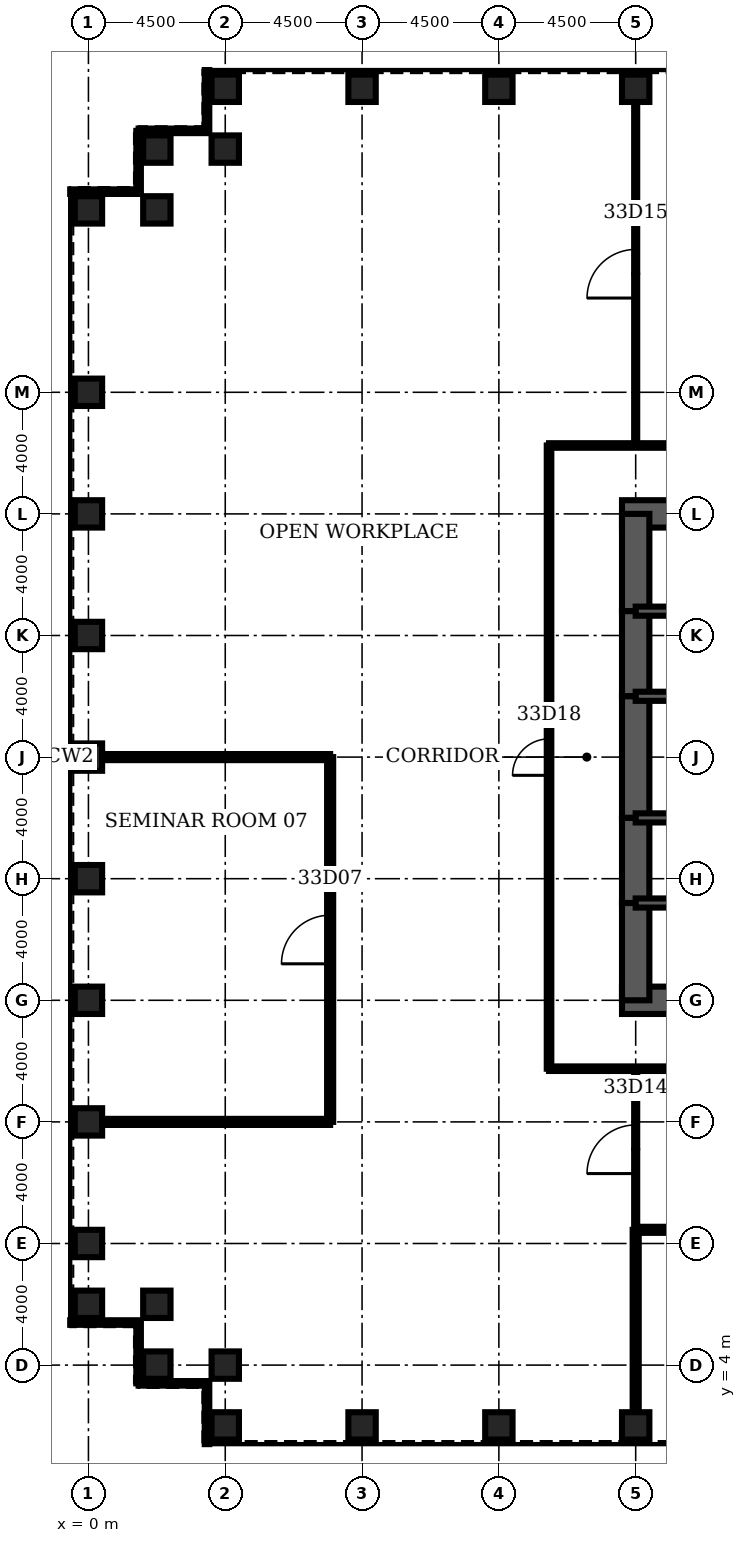
"""IFC4 building model, lengths in metres.
Left out: names, types, materials, properties, quantities, classifications, styles, units other than length and angle.
Written with IfcOpenShell. Run it as: python <this file> out.ifc"""

import sys

from ifc_helpers import new_model, si_unit, direction, frame, frame_2d, origin, origin_2d, place, context, subcontext, project, spatial, rectangle, hollow_rectangle, extrude, element, fill, save


model = new_model("IFC4")
c1 = context("Model", 3, precision=1e-05, world=origin(), true_north=direction((0.0, 1.0)))
c2 = subcontext(c1, "Body", "Model", "MODEL_VIEW")
j1 = project(units=[si_unit("LENGTHUNIT", "METRE"), si_unit("PLANEANGLEUNIT", "RADIAN")], contexts=[c1])
p1 = place(None, origin())
s1 = spatial("IfcSite", under=j1, at=p1, CompositionType="ELEMENT")
p2 = place(p1, origin())
s2 = spatial("IfcBuilding", under=s1, at=p2, CompositionType="ELEMENT")
p3 = place(p2, frame((0.0, 0.0, 150.9)))
s3 = spatial("IfcBuildingStorey", under=s2, at=p3, CompositionType="ELEMENT", Elevation=150.9)
for number, where, z_axis, x_axis in (
    (1, (4.5, 2.0, 0.0), (0.0, 0.0, 1.0), (0.0, 1.0, 0.0)),
    (2, (9.0, 2.0, 0.0), (0.0, 0.0, 1.0), (0.0, 1.0, 0.0)),
    (3, (13.5, 2.0, 0.0), (0.0, 0.0, 1.0), (0.0, 1.0, 0.0)),
    (4, (18.0, 2.0, 0.0), (0.0, 0.0, 1.0), (0.0, 1.0, 0.0)),
    (5, (18.0, 46.0, 0.0), (0.0, 0.0, 1.0), (0.0, 1.0, 0.0)),
    (6, (13.5, 46.0, 0.0), (0.0, 0.0, 1.0), (0.0, 1.0, 0.0)),
    (7, (9.0, 46.0, 0.0), (0.0, 0.0, 1.0), (0.0, 1.0, 0.0)),
    (8, (4.5, 46.0, 0.0), (0.0, 0.0, 1.0), (0.0, 1.0, 0.0)),
    (9, (4.5, 44.0, 0.0), (0.0, 0.0, 1.0), (0.0, 1.0, 0.0)),
    (10, (2.25, 44.0, 0.0), (0.0, 0.0, 1.0), (1.0, 0.0, 0.0)),
    (11, (2.25, 42.0, 0.0), (0.0, 0.0, 1.0), (1.0, 0.0, 0.0)),
    (12, (0.0, 42.0, 0.0), (0.0, 0.0, 1.0), (1.0, 0.0, 0.0)),
    (13, (0.0, 36.0, 0.0), (0.0, 0.0, 1.0), (1.0, 0.0, 0.0)),
    (14, (0.0, 32.0, 0.0), (0.0, 0.0, 1.0), (1.0, 0.0, 0.0)),
    (15, (0.0, 28.0, 0.0), (0.0, 0.0, 1.0), (1.0, 0.0, 0.0)),
    (16, (0.0, 24.0, 0.0), (0.0, 0.0, 1.0), (1.0, 0.0, 0.0)),
    (17, (0.0, 20.0, 0.0), (0.0, 0.0, 1.0), (1.0, 0.0, 0.0)),
    (18, (0.0, 16.0, 0.0), (0.0, 0.0, 1.0), (1.0, 0.0, 0.0)),
    (19, (0.0, 12.0, 0.0), (0.0, 0.0, 1.0), (1.0, 0.0, 0.0)),
    (20, (0.0, 8.0, 0.0), (0.0, 0.0, 1.0), (1.0, 0.0, 0.0)),
    (21, (0.0, 6.0, 0.0), (0.0, 0.0, 1.0), (1.0, 0.0, 0.0)),
    (22, (2.25, 6.0, 0.0), (0.0, 0.0, 1.0), (1.0, 0.0, 0.0)),
    (23, (2.25, 4.0, 0.0), (0.0, 0.0, 1.0), (1.0, 0.0, 0.0)),
    (24, (4.5, 4.0, 0.0), (0.0, 0.0, 1.0), (0.0, 1.0, 0.0)),
):
    element("IfcColumn", number, at=place(p3, frame(where, z_axis=z_axis, x_axis=x_axis)), inside=s3, PredefinedType="COLUMN", context=c2, shape_type="SweptSolid", body=[
        extrude(hollow_rectangle(XDim=0.9, YDim=0.9, WallThickness=0.1, at=origin_2d()), origin(), (0.0, 0.0, 1.0), 4.2),
    ])
for number, where, z_axis, x_axis in (
    (25, (17.55, 16.0, 0.0), (0.0, 0.0, 1.0), (1.0, 0.0, 0.0)),
    (26, (27.0, 32.0, 0.0), (0.0, 0.0, 1.0), (-1.0, 0.0, 0.0)),
):
    element("IfcWall", number, at=place(p3, frame(where, z_axis=z_axis, x_axis=x_axis)), inside=s3, PredefinedType="SHEAR", context=c2, shape_type="SweptSolid", body=[
        extrude(rectangle(XDim=9.45, YDim=0.9, at=frame_2d((4.725, 0.0))), origin(), (0.0, 0.0, 1.0), 4.2),
    ])
p4 = place(p3, frame((18.0, 32.0, 0.0), z_axis=(0.0, 0.0, 1.0), x_axis=(0.0, -1.0, 0.0)))
e27 = element("IfcWall", 27, at=p4, inside=s3, PredefinedType="SHEAR", context=c2, shape_type="SweptSolid", body=[
    extrude(rectangle(XDim=3.2, YDim=0.9, at=frame_2d((1.6, 0.0))), origin(), (0.0, 0.0, 1.0), 4.2),
])
p5 = place(p3, frame((18.0, 28.8, 0.0), z_axis=(0.0, 0.0, 1.0), x_axis=(0.0, -1.0, 0.0)))
e28 = element("IfcWall", 28, at=p5, inside=s3, PredefinedType="SHEAR", context=c2, shape_type="SweptSolid", body=[
    extrude(rectangle(XDim=2.8, YDim=0.9, at=frame_2d((1.4, 0.0))), origin(), (0.0, 0.0, 1.0), 4.2),
])
p6 = place(p5, frame((0.4, 0.0, 0.0)))
e29 = element("IfcOpeningElement", 29, at=p6, cuts=e28, PredefinedType="OPENING", context=c2, shape_type="SweptSolid", body=[
    extrude(rectangle(XDim=1.8, YDim=2.1, at=frame_2d((0.9, 1.05))), frame((0.0, 0.46, 0.0), z_axis=(0.0, -1.0, 0.0), x_axis=(1.0, 0.0, 0.0)), (0.0, 0.0, 1.0), 0.92),
])
p7 = place(p3, frame((18.0, 26.0, 0.0), z_axis=(0.0, 0.0, 1.0), x_axis=(0.0, -1.0, 0.0)))
e30 = element("IfcWall", 30, at=p7, inside=s3, PredefinedType="SHEAR", context=c2, shape_type="SweptSolid", body=[
    extrude(rectangle(XDim=4.0, YDim=0.9, at=frame_2d((2.0, 0.0))), origin(), (0.0, 0.0, 1.0), 4.2),
])
p8 = place(p3, frame((18.0, 22.0, 0.0), z_axis=(0.0, 0.0, 1.0), x_axis=(0.0, -1.0, 0.0)))
e31 = element("IfcWall", 31, at=p8, inside=s3, PredefinedType="SHEAR", context=c2, shape_type="SweptSolid", body=[
    extrude(rectangle(XDim=2.8, YDim=0.9, at=frame_2d((1.4, 0.0))), origin(), (0.0, 0.0, 1.0), 4.2),
])
p9 = place(p8, frame((0.6, 0.0, 0.0)))
e32 = element("IfcOpeningElement", 32, at=p9, cuts=e31, PredefinedType="OPENING", context=c2, shape_type="SweptSolid", body=[
    extrude(rectangle(XDim=1.8, YDim=2.1, at=frame_2d((0.9, 1.05))), frame((0.0, 0.46, 0.0), z_axis=(0.0, -1.0, 0.0), x_axis=(1.0, 0.0, 0.0)), (0.0, 0.0, 1.0), 0.92),
])
p10 = place(p3, frame((18.0, 19.2, 0.0), z_axis=(0.0, 0.0, 1.0), x_axis=(0.0, -1.0, 0.0)))
e33 = element("IfcWall", 33, at=p10, inside=s3, PredefinedType="SHEAR", context=c2, shape_type="SweptSolid", body=[
    extrude(rectangle(XDim=3.2, YDim=0.9, at=frame_2d((1.6, 0.0))), origin(), (0.0, 0.0, 1.0), 4.2),
])
p11 = place(p3, frame((18.0, 19.2, 0.0), z_axis=(0.0, 0.0, 1.0), x_axis=(1.0, 0.0, 0.0)))
e34 = element("IfcWall", 34, at=p11, inside=s3, PredefinedType="SOLIDWALL", context=c2, shape_type="SweptSolid", body=[
    extrude(rectangle(XDim=9.0, YDim=0.3, at=frame_2d((4.5, 0.0))), origin(), (0.0, 0.0, 1.0), 4.2),
])
p12 = place(p11, frame((0.65, 0.0, 0.0)))
e35 = element("IfcOpeningElement", 35, at=p12, cuts=e34, PredefinedType="OPENING", context=c2, shape_type="SweptSolid", body=[
    extrude(rectangle(XDim=1.0, YDim=2.1, at=frame_2d((0.5, 1.05))), frame((0.0, 0.16, 0.0), z_axis=(0.0, -1.0, 0.0), x_axis=(1.0, 0.0, 0.0)), (0.0, 0.0, 1.0), 0.32),
])
p13 = place(p3, frame((18.0, 28.8, 0.0), z_axis=(0.0, 0.0, 1.0), x_axis=(1.0, 0.0, 0.0)))
e36 = element("IfcWall", 36, at=p13, inside=s3, PredefinedType="SOLIDWALL", context=c2, shape_type="SweptSolid", body=[
    extrude(rectangle(XDim=9.0, YDim=0.3, at=frame_2d((4.5, 0.0))), origin(), (0.0, 0.0, 1.0), 4.2),
])
p14 = place(p13, frame((0.65, 0.0, 0.0)))
e37 = element("IfcOpeningElement", 37, at=p14, cuts=e36, PredefinedType="OPENING", context=c2, shape_type="SweptSolid", body=[
    extrude(rectangle(XDim=1.0, YDim=2.1, at=frame_2d((0.5, 1.05))), frame((0.0, 0.16, 0.0), z_axis=(0.0, -1.0, 0.0), x_axis=(1.0, 0.0, 0.0)), (0.0, 0.0, 1.0), 0.32),
])
p15 = place(p3, frame((18.0, 22.0, 0.0), z_axis=(0.0, 0.0, 1.0), x_axis=(1.0, 0.0, 0.0)))
e38 = element("IfcWall", 38, at=p15, inside=s3, PredefinedType="SOLIDWALL", context=c2, shape_type="SweptSolid", body=[
    extrude(rectangle(XDim=6.0, YDim=0.3, at=frame_2d((3.0, 0.0))), origin(), (0.0, 0.0, 1.0), 4.2),
])
p16 = place(p15, frame((4.4, 0.0, 0.0)))
e39 = element("IfcOpeningElement", 39, at=p16, cuts=e38, PredefinedType="OPENING", context=c2, shape_type="SweptSolid", body=[
    extrude(rectangle(XDim=1.0, YDim=2.1, at=frame_2d((0.5, 1.05))), frame((0.0, 0.16, 0.0), z_axis=(0.0, -1.0, 0.0), x_axis=(1.0, 0.0, 0.0)), (0.0, 0.0, 1.0), 0.32),
])
p17 = place(p15, frame((0.85, 0.0, 0.0)))
e40 = element("IfcOpeningElement", 40, at=p17, cuts=e38, PredefinedType="OPENING", context=c2, shape_type="SweptSolid", body=[
    extrude(rectangle(XDim=1.0, YDim=2.1, at=frame_2d((0.5, 1.05))), frame((0.0, 0.16, 0.0), z_axis=(0.0, -1.0, 0.0), x_axis=(1.0, 0.0, 0.0)), (0.0, 0.0, 1.0), 0.32),
])
p18 = place(p3, frame((18.0, 26.0, 0.0), z_axis=(0.0, 0.0, 1.0), x_axis=(1.0, 0.0, 0.0)))
e41 = element("IfcWall", 41, at=p18, inside=s3, PredefinedType="SOLIDWALL", context=c2, shape_type="SweptSolid", body=[
    extrude(rectangle(XDim=6.0, YDim=0.3, at=frame_2d((3.0, 0.0))), origin(), (0.0, 0.0, 1.0), 4.2),
])
p19 = place(p3, frame((18.0, 8.45, 0.0), z_axis=(0.0, 0.0, 1.0), x_axis=(1.0, 0.0, 0.0)))
e42 = element("IfcWall", 42, at=p19, inside=s3, PredefinedType="PARTITIONING", context=c2, shape_type="SweptSolid", body=[
    extrude(rectangle(XDim=36.0, YDim=0.2, at=frame_2d((18.0, 0.0))), origin(), (0.0, 0.0, 1.0), 3.0),
])
p20 = place(p19, frame((3.7, 0.0, 0.0)))
e43 = element("IfcOpeningElement", 43, at=p20, cuts=e42, PredefinedType="OPENING", context=c2, shape_type="SweptSolid", body=[
    extrude(rectangle(XDim=1.6, YDim=2.1, at=frame_2d((0.8, 1.05))), frame((0.0, 0.11, 0.0), z_axis=(0.0, -1.0, 0.0), x_axis=(1.0, 0.0, 0.0)), (0.0, 0.0, 1.0), 0.22),
])
p21 = place(p19, frame((12.7, 0.0, 0.0)))
e44 = element("IfcOpeningElement", 44, at=p21, cuts=e42, PredefinedType="OPENING", context=c2, shape_type="SweptSolid", body=[
    extrude(rectangle(XDim=1.6, YDim=2.1, at=frame_2d((0.8, 1.05))), frame((0.0, 0.11, 0.0), z_axis=(0.0, -1.0, 0.0), x_axis=(1.0, 0.0, 0.0)), (0.0, 0.0, 1.0), 0.22),
])
p22 = place(p19, frame((21.7, 0.0, 0.0)))
e45 = element("IfcOpeningElement", 45, at=p22, cuts=e42, PredefinedType="OPENING", context=c2, shape_type="SweptSolid", body=[
    extrude(rectangle(XDim=1.6, YDim=2.1, at=frame_2d((0.8, 1.05))), frame((0.0, 0.11, 0.0), z_axis=(0.0, -1.0, 0.0), x_axis=(1.0, 0.0, 0.0)), (0.0, 0.0, 1.0), 0.22),
])
p23 = place(p19, frame((30.7, 0.0, 0.0)))
e46 = element("IfcOpeningElement", 46, at=p23, cuts=e42, PredefinedType="OPENING", context=c2, shape_type="SweptSolid", body=[
    extrude(rectangle(XDim=1.6, YDim=2.1, at=frame_2d((0.8, 1.05))), frame((0.0, 0.11, 0.0), z_axis=(0.0, -1.0, 0.0), x_axis=(1.0, 0.0, 0.0)), (0.0, 0.0, 1.0), 0.22),
])
p24 = place(p3, frame((0.45, 12.0, 0.0), z_axis=(0.0, 0.0, 1.0), x_axis=(1.0, 0.0, 0.0)))
e47 = element("IfcWall", 47, at=p24, inside=s3, PredefinedType="PARTITIONING", context=c2, shape_type="SweptSolid", body=[
    extrude(rectangle(XDim=7.5, YDim=0.2, at=frame_2d((3.75, 0.0))), origin(), (0.0, 0.0, 1.0), 3.0),
])
p25 = place(p3, frame((15.15, 13.75, 0.0), z_axis=(0.0, 0.0, 1.0), x_axis=(1.0, 0.0, 0.0)))
e48 = element("IfcWall", 48, at=p25, inside=s3, PredefinedType="PARTITIONING", context=c2, shape_type="SweptSolid", body=[
    extrude(rectangle(XDim=41.7, YDim=0.15, at=frame_2d((20.85, 0.0))), origin(), (0.0, 0.0, 1.0), 3.0),
])
p26 = place(p25, frame((18.75, 0.0, 0.0)))
e49 = element("IfcOpeningElement", 49, at=p26, cuts=e48, PredefinedType="OPENING", context=c2, shape_type="SweptSolid", body=[
    extrude(rectangle(XDim=1.2, YDim=2.1, at=frame_2d((0.6, 1.05))), frame((0.0, 0.085, 0.0), z_axis=(0.0, -1.0, 0.0), x_axis=(1.0, 0.0, 0.0)), (0.0, 0.0, 1.0), 0.17),
])
p27 = place(p3, frame((0.45, 24.0, 0.0), z_axis=(0.0, 0.0, 1.0), x_axis=(1.0, 0.0, 0.0)))
e50 = element("IfcWall", 50, at=p27, inside=s3, PredefinedType="PARTITIONING", context=c2, shape_type="SweptSolid", body=[
    extrude(rectangle(XDim=7.5, YDim=0.2, at=frame_2d((3.75, 0.0))), origin(), (0.0, 0.0, 1.0), 3.0),
])
p28 = place(p3, frame((15.15, 34.25, 0.0), z_axis=(0.0, 0.0, 1.0), x_axis=(1.0, 0.0, 0.0)))
e51 = element("IfcWall", 51, at=p28, inside=s3, PredefinedType="PARTITIONING", context=c2, shape_type="SweptSolid", body=[
    extrude(rectangle(XDim=41.7, YDim=0.15, at=frame_2d((20.85, 0.0))), origin(), (0.0, 0.0, 1.0), 3.0),
])
p29 = place(p28, frame((20.25, 0.0, 0.0)))
e52 = element("IfcOpeningElement", 52, at=p29, cuts=e51, PredefinedType="OPENING", context=c2, shape_type="SweptSolid", body=[
    extrude(rectangle(XDim=1.2, YDim=2.1, at=frame_2d((0.6, 1.05))), frame((0.0, 0.085, 0.0), z_axis=(0.0, -1.0, 0.0), x_axis=(1.0, 0.0, 0.0)), (0.0, 0.0, 1.0), 0.17),
])
p30 = place(p3, frame((7.95, 12.0, 0.0), z_axis=(0.0, 0.0, 1.0), x_axis=(0.0, 1.0, 0.0)))
e53 = element("IfcWall", 53, at=p30, inside=s3, PredefinedType="PARTITIONING", context=c2, shape_type="SweptSolid", body=[
    extrude(rectangle(XDim=12.0, YDim=0.2, at=frame_2d((6.0, 0.0))), origin(), (0.0, 0.0, 1.0), 3.0),
])
p31 = place(p30, frame((5.2, 0.0, 0.0)))
e54 = element("IfcOpeningElement", 54, at=p31, cuts=e53, PredefinedType="OPENING", context=c2, shape_type="SweptSolid", body=[
    extrude(rectangle(XDim=1.6, YDim=2.1, at=frame_2d((0.8, 1.05))), frame((0.0, 0.11, 0.0), z_axis=(0.0, -1.0, 0.0), x_axis=(1.0, 0.0, 0.0)), (0.0, 0.0, 1.0), 0.22),
])
p32 = place(p3, frame((15.15, 13.75, 0.0), z_axis=(0.0, 0.0, 1.0), x_axis=(0.0, 1.0, 0.0)))
e55 = element("IfcWall", 55, at=p32, inside=s3, PredefinedType="PARTITIONING", context=c2, shape_type="SweptSolid", body=[
    extrude(rectangle(XDim=20.5, YDim=0.15, at=frame_2d((10.25, 0.0))), origin(), (0.0, 0.0, 1.0), 3.0),
])
p33 = place(p32, frame((9.65, 0.0, 0.0)))
e56 = element("IfcOpeningElement", 56, at=p33, cuts=e55, PredefinedType="OPENING", context=c2, shape_type="SweptSolid", body=[
    extrude(rectangle(XDim=1.2, YDim=2.1, at=frame_2d((0.6, 1.05))), frame((0.0, 0.085, 0.0), z_axis=(0.0, -1.0, 0.0), x_axis=(1.0, 0.0, 0.0)), (0.0, 0.0, 1.0), 0.17),
])
p34 = place(p3, frame((18.0, 2.45, 0.0), z_axis=(0.0, 0.0, 1.0), x_axis=(0.0, 1.0, 0.0)))
e57 = element("IfcWall", 57, at=p34, inside=s3, PredefinedType="PARTITIONING", context=c2, shape_type="SweptSolid", body=[
    extrude(rectangle(XDim=6.0, YDim=0.2, at=frame_2d((3.0, 0.0))), origin(), (0.0, 0.0, 1.0), 3.0),
])
p35 = place(p3, frame((18.0, 8.45, 0.0), z_axis=(0.0, 0.0, 1.0), x_axis=(0.0, 1.0, 0.0)))
e58 = element("IfcWall", 58, at=p35, inside=s3, PredefinedType="PARTITIONING", context=c2, shape_type="SweptSolid", body=[
    extrude(rectangle(XDim=5.3, YDim=0.1, at=frame_2d((2.65, 0.0))), origin(), (0.0, 0.0, 1.0), 3.0),
])
p36 = place(p35, frame((1.85, 0.0, 0.0)))
e59 = element("IfcOpeningElement", 59, at=p36, cuts=e58, PredefinedType="OPENING", context=c2, shape_type="SweptSolid", body=[
    extrude(rectangle(XDim=1.6, YDim=2.1, at=frame_2d((0.8, 1.05))), frame((0.0, 0.06, 0.0), z_axis=(0.0, -1.0, 0.0), x_axis=(1.0, 0.0, 0.0)), (0.0, 0.0, 1.0), 0.12),
])
p37 = place(p3, frame((18.0, 34.25, 0.0), z_axis=(0.0, 0.0, 1.0), x_axis=(0.0, 1.0, 0.0)))
e60 = element("IfcWall", 60, at=p37, inside=s3, PredefinedType="PARTITIONING", context=c2, shape_type="SweptSolid", body=[
    extrude(rectangle(XDim=11.3, YDim=0.1, at=frame_2d((5.65, 0.0))), origin(), (0.0, 0.0, 1.0), 3.0),
])
p38 = place(p37, frame((4.85, 0.0, 0.0)))
e61 = element("IfcOpeningElement", 61, at=p38, cuts=e60, PredefinedType="OPENING", context=c2, shape_type="SweptSolid", body=[
    extrude(rectangle(XDim=1.6, YDim=2.1, at=frame_2d((0.8, 1.05))), frame((0.0, 0.06, 0.0), z_axis=(0.0, -1.0, 0.0), x_axis=(1.0, 0.0, 0.0)), (0.0, 0.0, 1.0), 0.12),
])
p39 = place(p3, frame((3.9, 46.6, 0.0), z_axis=(0.0, 0.0, 1.0), x_axis=(0.0, -1.0, 0.0)))
e62 = element("IfcWall", 62, at=p39, inside=s3, PredefinedType="ELEMENTEDWALL", context=c2, shape_type="SweptSolid", body=[
    extrude(rectangle(XDim=2.0, YDim=0.15, at=frame_2d((1.0, 0.0))), origin(), (0.0, 0.0, 1.0), 4.04),
])
p40 = place(p3, frame((3.9, 44.6, 0.0), z_axis=(0.0, 0.0, 1.0), x_axis=(-1.0, 0.0, 0.0)))
e63 = element("IfcWall", 63, at=p40, inside=s3, PredefinedType="ELEMENTEDWALL", context=c2, shape_type="SweptSolid", body=[
    extrude(rectangle(XDim=2.25, YDim=0.15, at=frame_2d((1.125, 0.0))), origin(), (0.0, 0.0, 1.0), 4.04),
])
p41 = place(p3, frame((1.65, 44.6, 0.0), z_axis=(0.0, 0.0, 1.0), x_axis=(0.0, -1.0, 0.0)))
e64 = element("IfcWall", 64, at=p41, inside=s3, PredefinedType="ELEMENTEDWALL", context=c2, shape_type="SweptSolid", body=[
    extrude(rectangle(XDim=2.0, YDim=0.15, at=frame_2d((1.0, 0.0))), origin(), (0.0, 0.0, 1.0), 4.04),
])
for number, where, z_axis, x_axis in (
    (65, (1.65, 42.6, 0.0), (0.0, 0.0, 1.0), (-1.0, 0.0, 0.0)),
    (66, (-0.6, 5.4, 0.0), (0.0, 0.0, 1.0), (1.0, 0.0, 0.0)),
):
    element("IfcWall", number, at=place(p3, frame(where, z_axis=z_axis, x_axis=x_axis)), inside=s3, PredefinedType="ELEMENTEDWALL", context=c2, shape_type="SweptSolid", body=[
        extrude(rectangle(XDim=2.25, YDim=0.15, at=frame_2d((1.125, 0.0))), origin(), (0.0, 0.0, 1.0), 4.04),
    ])
p42 = place(p3, frame((1.65, 5.4, 0.0), z_axis=(0.0, 0.0, 1.0), x_axis=(0.0, -1.0, 0.0)))
e67 = element("IfcWall", 67, at=p42, inside=s3, PredefinedType="ELEMENTEDWALL", context=c2, shape_type="SweptSolid", body=[
    extrude(rectangle(XDim=2.0, YDim=0.15, at=frame_2d((1.0, 0.0))), origin(), (0.0, 0.0, 1.0), 4.04),
])
p43 = place(p3, frame((1.65, 3.4, 0.0), z_axis=(0.0, 0.0, 1.0), x_axis=(1.0, 0.0, 0.0)))
e68 = element("IfcWall", 68, at=p43, inside=s3, PredefinedType="ELEMENTEDWALL", context=c2, shape_type="SweptSolid", body=[
    extrude(rectangle(XDim=2.25, YDim=0.15, at=frame_2d((1.125, 0.0))), origin(), (0.0, 0.0, 1.0), 4.04),
])
p44 = place(p3, frame((3.9, 3.4, 0.0), z_axis=(0.0, 0.0, 1.0), x_axis=(0.0, -1.0, 0.0)))
e69 = element("IfcWall", 69, at=p44, inside=s3, PredefinedType="ELEMENTEDWALL", context=c2, shape_type="SweptSolid", body=[
    extrude(rectangle(XDim=2.0, YDim=0.15, at=frame_2d((1.0, 0.0))), origin(), (0.0, 0.0, 1.0), 4.04),
])
p45 = place(p31, origin())
e70 = element("IfcDoor", 70, at=p45, inside=s3, OperationType="SINGLE_SWING_LEFT", PredefinedType="DOOR", context=c2, shape_type="SweptSolid", body=[
    extrude(rectangle(XDim=1.6, YDim=2.1, at=frame_2d((0.8, 1.05))), frame((0.0, 0.025, 0.0), z_axis=(0.0, -1.0, 0.0), x_axis=(1.0, 0.0, 0.0)), (0.0, 0.0, 1.0), 0.05),
])
fill(e54, e70)
p46 = place(p36, origin())
e71 = element("IfcDoor", 71, at=p46, inside=s3, OperationType="SINGLE_SWING_LEFT", PredefinedType="DOOR", context=c2, shape_type="SweptSolid", body=[
    extrude(rectangle(XDim=1.6, YDim=2.1, at=frame_2d((0.8, 1.05))), frame((0.0, 0.025, 0.0), z_axis=(0.0, -1.0, 0.0), x_axis=(1.0, 0.0, 0.0)), (0.0, 0.0, 1.0), 0.05),
])
fill(e59, e71)
p47 = place(p38, origin())
e72 = element("IfcDoor", 72, at=p47, inside=s3, OperationType="SINGLE_SWING_LEFT", PredefinedType="DOOR", context=c2, shape_type="SweptSolid", body=[
    extrude(rectangle(XDim=1.6, YDim=2.1, at=frame_2d((0.8, 1.05))), frame((0.0, 0.025, 0.0), z_axis=(0.0, -1.0, 0.0), x_axis=(1.0, 0.0, 0.0)), (0.0, 0.0, 1.0), 0.05),
])
fill(e61, e72)
p48 = place(p33, origin())
e73 = element("IfcDoor", 73, at=p48, inside=s3, OperationType="SINGLE_SWING_LEFT", PredefinedType="DOOR", context=c2, shape_type="SweptSolid", body=[
    extrude(rectangle(XDim=1.2, YDim=2.1, at=frame_2d((0.6, 1.05))), frame((0.0, 0.025, 0.0), z_axis=(0.0, -1.0, 0.0), x_axis=(1.0, 0.0, 0.0)), (0.0, 0.0, 1.0), 0.05),
])
fill(e56, e73)
p49 = place(p12, origin())
e74 = element("IfcDoor", 74, at=p49, inside=s3, OperationType="SINGLE_SWING_LEFT", PredefinedType="DOOR", context=c2, shape_type="SweptSolid", body=[
    extrude(rectangle(XDim=1.0, YDim=2.1, at=frame_2d((0.5, 1.05))), frame((0.0, 0.025, 0.0), z_axis=(0.0, -1.0, 0.0), x_axis=(1.0, 0.0, 0.0)), (0.0, 0.0, 1.0), 0.05),
])
fill(e35, e74)
p50 = place(p14, origin())
e75 = element("IfcDoor", 75, at=p50, inside=s3, OperationType="SINGLE_SWING_LEFT", PredefinedType="DOOR", context=c2, shape_type="SweptSolid", body=[
    extrude(rectangle(XDim=1.0, YDim=2.1, at=frame_2d((0.5, 1.05))), frame((0.0, 0.025, 0.0), z_axis=(0.0, -1.0, 0.0), x_axis=(1.0, 0.0, 0.0)), (0.0, 0.0, 1.0), 0.05),
])
fill(e37, e75)
p51 = place(p9, origin())
e76 = element("IfcDoor", 76, at=p51, inside=s3, OperationType="SINGLE_SWING_LEFT", PredefinedType="DOOR", context=c2, shape_type="SweptSolid", body=[
    extrude(rectangle(XDim=1.8, YDim=2.1, at=frame_2d((0.9, 1.05))), frame((0.0, 0.45, 0.0), z_axis=(0.0, -1.0, 0.0), x_axis=(1.0, 0.0, 0.0)), (0.0, 0.0, 1.0), 0.899),
])
fill(e32, e76)
p52 = place(p6, origin())
e77 = element("IfcDoor", 77, at=p52, inside=s3, OperationType="SINGLE_SWING_LEFT", PredefinedType="DOOR", context=c2, shape_type="SweptSolid", body=[
    extrude(rectangle(XDim=1.8, YDim=2.1, at=frame_2d((0.9, 1.05))), frame((0.0, 0.45, 0.0), z_axis=(0.0, -1.0, 0.0), x_axis=(1.0, 0.0, 0.0)), (0.0, 0.0, 1.0), 0.899),
])
fill(e29, e77)
p53 = place(p17, origin())
e78 = element("IfcDoor", 78, at=p53, inside=s3, OperationType="SINGLE_SWING_LEFT", PredefinedType="DOOR", context=c2, shape_type="SweptSolid", body=[
    extrude(rectangle(XDim=1.0, YDim=2.1, at=frame_2d((0.5, 1.05))), frame((0.0, 0.025, 0.0), z_axis=(0.0, -1.0, 0.0), x_axis=(1.0, 0.0, 0.0)), (0.0, 0.0, 1.0), 0.05),
])
fill(e40, e78)
save(model, sys.argv[1])
